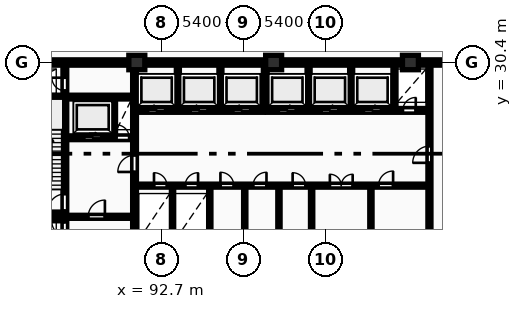
"""IFC4 building model, lengths in metres.
Left out: names, types, materials, properties, quantities, classifications, styles, units other than length and angle.
Written with IfcOpenShell. Run it as: python <this file> out.ifc"""

import sys

from ifc_helpers import new_model, si_unit, direction, frame, frame_2d, origin, origin_2d, place, context, subcontext, project, spatial, rectangle, extrude, element, fill, save


model = new_model("IFC4")
c1 = context("Model", 3, precision=1e-05, world=origin(), true_north=direction((0.0, 1.0)))
c2 = subcontext(c1, "Body", "Model", "MODEL_VIEW")
j1 = project(units=[si_unit("LENGTHUNIT", "METRE"), si_unit("PLANEANGLEUNIT", "RADIAN")], contexts=[c1])
p1 = place(None, origin())
s1 = spatial("IfcSite", under=j1, at=p1, CompositionType="ELEMENT")
p2 = place(p1, origin())
s2 = spatial("IfcBuilding", under=s1, at=p2, CompositionType="ELEMENT")
p3 = place(p2, origin())
s3 = spatial("IfcBuildingStorey", under=s2, at=p3, CompositionType="ELEMENT", Elevation=0.0)
for number, where, z_axis, x_axis in (
    (1, (91.1, 30.4, 0.0), (0.0, 0.0, 1.0), (1.0, 0.0, 0.0)),
    (2, (100.1, 30.4, 0.0), (0.0, 0.0, 1.0), (1.0, 0.0, 0.0)),
    (3, (109.1, 30.4, 0.0), (0.0, 0.0, 1.0), (1.0, 0.0, 0.0)),
):
    element("IfcColumn", number, at=place(p3, frame(where, z_axis=z_axis, x_axis=x_axis)), inside=s3, PredefinedType="COLUMN", context=c2, shape_type="SweptSolid", body=[
        extrude(rectangle(XDim=1.05, YDim=0.95, at=origin_2d()), origin(), (0.0, 0.0, 1.0), 5.4),
    ])
p4 = place(p3, frame((81.925, 30.4, 0.0), z_axis=(0.0, 0.0, 1.0), x_axis=(1.0, 0.0, 0.0)))
e4 = element("IfcWall", 4, at=p4, inside=s3, PredefinedType="SHEAR", context=c2, shape_type="SweptSolid", body=[
    extrude(rectangle(XDim=36.265, YDim=0.35, at=frame_2d((18.132, 0.0))), origin(), (0.0, 0.0, 1.0), 5.4),
])
p5 = place(p3, frame((86.365, 18.6, 0.0), z_axis=(0.0, 0.0, 1.0), x_axis=(0.0, 1.0, 0.0)))
e5 = element("IfcWall", 5, at=p5, inside=s3, PredefinedType="SHEAR", context=c2, shape_type="SweptSolid", body=[
    extrude(rectangle(XDim=11.6, YDim=0.25, at=frame_2d((5.8, 0.0))), origin(), (0.0, 0.0, 1.0), 5.4),
])
p6 = place(p5, frame((0.45, 0.0, 0.0)))
e6 = element("IfcOpeningElement", 6, at=p6, cuts=e5, PredefinedType="OPENING", context=c2, shape_type="SweptSolid", body=[
    extrude(rectangle(XDim=0.85, YDim=2.05, at=frame_2d((0.425, 1.025))), frame((0.0, 0.135, 0.0), z_axis=(0.0, -1.0, 0.0), x_axis=(1.0, 0.0, 0.0)), (0.0, 0.0, 1.0), 0.27),
])
p7 = place(p5, frame((2.05, 0.0, 0.0)))
e7 = element("IfcOpeningElement", 7, at=p7, cuts=e5, PredefinedType="OPENING", context=c2, shape_type="SweptSolid", body=[
    extrude(rectangle(XDim=1.1, YDim=2.1, at=frame_2d((0.55, 1.05))), frame((0.0, 0.135, 0.0), z_axis=(0.0, -1.0, 0.0), x_axis=(1.0, 0.0, 0.0)), (0.0, 0.0, 1.0), 0.27),
])
p8 = place(p5, frame((9.95, 0.0, 0.0)))
e8 = element("IfcOpeningElement", 8, at=p8, cuts=e5, PredefinedType="OPENING", context=c2, shape_type="SweptSolid", body=[
    extrude(rectangle(XDim=0.85, YDim=2.05, at=frame_2d((0.425, 1.025))), frame((0.0, 0.135, 0.0), z_axis=(0.0, -1.0, 0.0), x_axis=(1.0, 0.0, 0.0)), (0.0, 0.0, 1.0), 0.27),
])
p9 = place(p3, frame((83.0, 20.275, 0.0), z_axis=(0.0, 0.0, 1.0), x_axis=(1.0, 0.0, 0.0)))
e9 = element("IfcWall", 9, at=p9, inside=s3, PredefinedType="SHEAR", context=c2, shape_type="SweptSolid", body=[
    extrude(rectangle(XDim=3.24, YDim=0.25, at=frame_2d((1.62, 0.0))), origin(), (0.0, 0.0, 1.0), 5.4),
])
p10 = place(p3, frame((83.0, 28.125, 0.0), z_axis=(0.0, 0.0, 1.0), x_axis=(1.0, 0.0, 0.0)))
e10 = element("IfcWall", 10, at=p10, inside=s3, PredefinedType="SHEAR", context=c2, shape_type="SweptSolid", body=[
    extrude(rectangle(XDim=7.82, YDim=0.25, at=frame_2d((3.91, 0.0))), origin(), (0.0, 0.0, 1.0), 5.4),
])
p11 = place(p3, frame((86.5, 25.45, 0.0), z_axis=(0.0, 0.0, 1.0), x_axis=(1.0, 0.0, 0.0)))
e11 = element("IfcWall", 11, at=p11, inside=s3, PredefinedType="SHEAR", context=c2, shape_type="SweptSolid", body=[
    extrude(rectangle(XDim=4.32, YDim=0.25, at=frame_2d((2.16, 0.0))), origin(), (0.0, 0.0, 1.0), 5.4),
])
p12 = place(p11, frame((1.14, 0.0, 0.0)))
e12 = element("IfcOpeningElement", 12, at=p12, cuts=e11, PredefinedType="OPENING", context=c2, shape_type="SweptSolid", body=[
    extrude(rectangle(XDim=1.12, YDim=2.12, at=frame_2d((0.56, 1.06))), frame((0.0, 0.135, 0.0), z_axis=(0.0, -1.0, 0.0), x_axis=(1.0, 0.0, 0.0)), (0.0, 0.0, 1.0), 0.27),
])
p13 = place(p11, frame((3.25, 0.0, 0.0)))
e13 = element("IfcOpeningElement", 13, at=p13, cuts=e11, PredefinedType="OPENING", context=c2, shape_type="SweptSolid", body=[
    extrude(rectangle(XDim=0.85, YDim=2.05, at=frame_2d((0.425, 1.025))), frame((0.0, 0.135, 0.0), z_axis=(0.0, -1.0, 0.0), x_axis=(1.0, 0.0, 0.0)), (0.0, 0.0, 1.0), 0.27),
])
p14 = place(p3, frame((89.6, 25.58, 0.0), z_axis=(0.0, 0.0, 1.0), x_axis=(0.0, 1.0, 0.0)))
e14 = element("IfcWall", 14, at=p14, inside=s3, PredefinedType="PARTITIONING", context=c2, shape_type="SweptSolid", body=[
    extrude(rectangle(XDim=2.42, YDim=0.2, at=frame_2d((1.21, 0.0))), origin(), (0.0, 0.0, 1.0), 5.1),
])
p15 = place(p3, frame((86.5, 20.25, 0.0), z_axis=(0.0, 0.0, 1.0), x_axis=(1.0, 0.0, 0.0)))
e15 = element("IfcWall", 15, at=p15, inside=s3, PredefinedType="PARTITIONING", context=c2, shape_type="SweptSolid", body=[
    extrude(rectangle(XDim=4.32, YDim=0.2, at=frame_2d((2.16, 0.0))), origin(), (0.0, 0.0, 1.0), 5.1),
])
p16 = place(p15, frame((1.4, 0.0, 0.0)))
e16 = element("IfcOpeningElement", 16, at=p16, cuts=e15, PredefinedType="OPENING", context=c2, shape_type="SweptSolid", body=[
    extrude(rectangle(XDim=1.1, YDim=2.1, at=frame_2d((0.55, 1.05))), frame((0.0, 0.11, 0.0), z_axis=(0.0, -1.0, 0.0), x_axis=(1.0, 0.0, 0.0)), (0.0, 0.0, 1.0), 0.22),
])
p17 = place(p3, frame((90.95, 18.6, 0.0), z_axis=(0.0, 0.0, 1.0), x_axis=(0.0, 1.0, 0.0)))
e17 = element("IfcWall", 17, at=p17, inside=s3, PredefinedType="SHEAR", context=c2, shape_type="SweptSolid", body=[
    extrude(rectangle(XDim=11.6, YDim=0.25, at=frame_2d((5.8, 0.0))), origin(), (0.0, 0.0, 1.0), 5.4),
])
p18 = place(p17, frame((4.6, 0.0, 0.0)))
e18 = element("IfcOpeningElement", 18, at=p18, cuts=e17, PredefinedType="OPENING", context=c2, shape_type="SweptSolid", body=[
    extrude(rectangle(XDim=1.1, YDim=2.1, at=frame_2d((0.55, 1.05))), frame((0.0, 0.135, 0.0), z_axis=(0.0, -1.0, 0.0), x_axis=(1.0, 0.0, 0.0)), (0.0, 0.0, 1.0), 0.27),
])
for number, where, z_axis, x_axis in (
    (19, (93.8, 27.38, 0.0), (0.0, 0.0, 1.0), (0.0, 1.0, 0.0)),
    (20, (96.6, 27.38, 0.0), (0.0, 0.0, 1.0), (0.0, 1.0, 0.0)),
):
    element("IfcWall", number, at=place(p3, frame(where, z_axis=z_axis, x_axis=x_axis)), inside=s3, PredefinedType="PARTITIONING", context=c2, shape_type="SweptSolid", body=[
        extrude(rectangle(XDim=2.82, YDim=0.2, at=frame_2d((1.41, 0.0))), origin(), (0.0, 0.0, 1.0), 5.1),
    ])
p19 = place(p3, frame((91.08, 27.25, 0.0), z_axis=(0.0, 0.0, 1.0), x_axis=(1.0, 0.0, 0.0)))
e21 = element("IfcWall", 21, at=p19, inside=s3, PredefinedType="SHEAR", context=c2, shape_type="SweptSolid", body=[
    extrude(rectangle(XDim=8.34, YDim=0.25, at=frame_2d((4.17, 0.0))), origin(), (0.0, 0.0, 1.0), 5.4),
])
p20 = place(p19, frame((0.76, 0.0, 0.0)))
e22 = element("IfcOpeningElement", 22, at=p20, cuts=e21, PredefinedType="OPENING", context=c2, shape_type="SweptSolid", body=[
    extrude(rectangle(XDim=1.12, YDim=2.12, at=frame_2d((0.56, 1.06))), frame((0.0, 0.135, 0.0), z_axis=(0.0, -1.0, 0.0), x_axis=(1.0, 0.0, 0.0)), (0.0, 0.0, 1.0), 0.27),
])
p21 = place(p19, frame((3.56, 0.0, 0.0)))
e23 = element("IfcOpeningElement", 23, at=p21, cuts=e21, PredefinedType="OPENING", context=c2, shape_type="SweptSolid", body=[
    extrude(rectangle(XDim=1.12, YDim=2.12, at=frame_2d((0.56, 1.06))), frame((0.0, 0.135, 0.0), z_axis=(0.0, -1.0, 0.0), x_axis=(1.0, 0.0, 0.0)), (0.0, 0.0, 1.0), 0.27),
])
p22 = place(p19, frame((6.36, 0.0, 0.0)))
e24 = element("IfcOpeningElement", 24, at=p22, cuts=e21, PredefinedType="OPENING", context=c2, shape_type="SweptSolid", body=[
    extrude(rectangle(XDim=1.12, YDim=2.12, at=frame_2d((0.56, 1.06))), frame((0.0, 0.135, 0.0), z_axis=(0.0, -1.0, 0.0), x_axis=(1.0, 0.0, 0.0)), (0.0, 0.0, 1.0), 0.27),
])
p23 = place(p3, frame((99.55, 27.25, 0.0), z_axis=(0.0, 0.0, 1.0), x_axis=(0.0, 1.0, 0.0)))
e25 = element("IfcWall", 25, at=p23, inside=s3, PredefinedType="SHEAR", context=c2, shape_type="SweptSolid", body=[
    extrude(rectangle(XDim=2.95, YDim=0.25, at=frame_2d((1.475, 0.0))), origin(), (0.0, 0.0, 1.0), 5.4),
])
for number, where, z_axis, x_axis in (
    (26, (102.4, 27.38, 0.0), (0.0, 0.0, 1.0), (0.0, 1.0, 0.0)),
    (27, (105.2, 27.38, 0.0), (0.0, 0.0, 1.0), (0.0, 1.0, 0.0)),
    (28, (108.05, 27.38, 0.0), (0.0, 0.0, 1.0), (0.0, 1.0, 0.0)),
):
    element("IfcWall", number, at=place(p3, frame(where, z_axis=z_axis, x_axis=x_axis)), inside=s3, PredefinedType="PARTITIONING", context=c2, shape_type="SweptSolid", body=[
        extrude(rectangle(XDim=2.82, YDim=0.2, at=frame_2d((1.41, 0.0))), origin(), (0.0, 0.0, 1.0), 5.1),
    ])
p24 = place(p3, frame((99.68, 27.25, 0.0), z_axis=(0.0, 0.0, 1.0), x_axis=(1.0, 0.0, 0.0)))
e29 = element("IfcWall", 29, at=p24, inside=s3, PredefinedType="SHEAR", context=c2, shape_type="SweptSolid", body=[
    extrude(rectangle(XDim=10.54, YDim=0.25, at=frame_2d((5.27, 0.0))), origin(), (0.0, 0.0, 1.0), 5.4),
])
p25 = place(p24, frame((0.76, 0.0, 0.0)))
e30 = element("IfcOpeningElement", 30, at=p25, cuts=e29, PredefinedType="OPENING", context=c2, shape_type="SweptSolid", body=[
    extrude(rectangle(XDim=1.12, YDim=2.12, at=frame_2d((0.56, 1.06))), frame((0.0, 0.135, 0.0), z_axis=(0.0, -1.0, 0.0), x_axis=(1.0, 0.0, 0.0)), (0.0, 0.0, 1.0), 0.27),
])
p26 = place(p24, frame((3.56, 0.0, 0.0)))
e31 = element("IfcOpeningElement", 31, at=p26, cuts=e29, PredefinedType="OPENING", context=c2, shape_type="SweptSolid", body=[
    extrude(rectangle(XDim=1.12, YDim=2.12, at=frame_2d((0.56, 1.06))), frame((0.0, 0.135, 0.0), z_axis=(0.0, -1.0, 0.0), x_axis=(1.0, 0.0, 0.0)), (0.0, 0.0, 1.0), 0.27),
])
p27 = place(p24, frame((6.36, 0.0, 0.0)))
e32 = element("IfcOpeningElement", 32, at=p27, cuts=e29, PredefinedType="OPENING", context=c2, shape_type="SweptSolid", body=[
    extrude(rectangle(XDim=1.12, YDim=2.12, at=frame_2d((0.56, 1.06))), frame((0.0, 0.135, 0.0), z_axis=(0.0, -1.0, 0.0), x_axis=(1.0, 0.0, 0.0)), (0.0, 0.0, 1.0), 0.27),
])
p28 = place(p24, frame((8.92, 0.0, 0.0)))
e33 = element("IfcOpeningElement", 33, at=p28, cuts=e29, PredefinedType="OPENING", context=c2, shape_type="SweptSolid", body=[
    extrude(rectangle(XDim=0.85, YDim=2.05, at=frame_2d((0.425, 1.025))), frame((0.0, 0.135, 0.0), z_axis=(0.0, -1.0, 0.0), x_axis=(1.0, 0.0, 0.0)), (0.0, 0.0, 1.0), 0.27),
])
for number, where, z_axis, x_axis in (
    (34, (93.45, 18.6, 0.0), (0.0, 0.0, 1.0), (0.0, 1.0, 0.0)),
    (35, (95.9, 18.6, 0.0), (0.0, 0.0, 1.0), (0.0, 1.0, 0.0)),
    (36, (98.2, 18.6, 0.0), (0.0, 0.0, 1.0), (0.0, 1.0, 0.0)),
):
    element("IfcWall", number, at=place(p3, frame(where, z_axis=z_axis, x_axis=x_axis)), inside=s3, PredefinedType="PARTITIONING", context=c2, shape_type="SweptSolid", body=[
        extrude(rectangle(XDim=3.6, YDim=0.15, at=frame_2d((1.8, 0.0))), origin(), (0.0, 0.0, 1.0), 5.1),
    ])
p29 = place(p3, frame((100.45, 18.6, 0.0), z_axis=(0.0, 0.0, 1.0), x_axis=(0.0, 1.0, 0.0)))
e37 = element("IfcWall", 37, at=p29, inside=s3, PredefinedType="PARTITIONING", context=c2, shape_type="SweptSolid", body=[
    extrude(rectangle(XDim=3.6, YDim=0.15, at=frame_2d((1.8, 0.0))), origin(), (0.0, 0.0, 1.0), 4.35),
])
for number, where, z_axis, x_axis in (
    (38, (102.6, 18.6, 0.0), (0.0, 0.0, 1.0), (0.0, 1.0, 0.0)),
    (39, (106.5, 18.6, 0.0), (0.0, 0.0, 1.0), (0.0, 1.0, 0.0)),
):
    element("IfcWall", number, at=place(p3, frame(where, z_axis=z_axis, x_axis=x_axis)), inside=s3, PredefinedType="PARTITIONING", context=c2, shape_type="SweptSolid", body=[
        extrude(rectangle(XDim=3.6, YDim=0.15, at=frame_2d((1.8, 0.0))), origin(), (0.0, 0.0, 1.0), 5.1),
    ])
p30 = place(p3, frame((91.08, 22.3, 0.0), z_axis=(0.0, 0.0, 1.0), x_axis=(1.0, 0.0, 0.0)))
e40 = element("IfcWall", 40, at=p30, inside=s3, PredefinedType="PARTITIONING", context=c2, shape_type="SweptSolid", body=[
    extrude(rectangle(XDim=19.14, YDim=0.2, at=frame_2d((9.57, 0.0))), origin(), (0.0, 0.0, 1.0), 5.1),
])
p31 = place(p30, frame((1.15, 0.0, 0.0)))
e41 = element("IfcOpeningElement", 41, at=p31, cuts=e40, PredefinedType="OPENING", context=c2, shape_type="SweptSolid", body=[
    extrude(rectangle(XDim=0.85, YDim=2.05, at=frame_2d((0.425, 1.025))), frame((0.0, 0.11, 0.0), z_axis=(0.0, -1.0, 0.0), x_axis=(1.0, 0.0, 0.0)), (0.0, 0.0, 1.0), 0.22),
])
p32 = place(p30, frame((3.2, 0.0, 0.0)))
e42 = element("IfcOpeningElement", 42, at=p32, cuts=e40, PredefinedType="OPENING", context=c2, shape_type="SweptSolid", body=[
    extrude(rectangle(XDim=0.85, YDim=2.05, at=frame_2d((0.425, 1.025))), frame((0.0, 0.11, 0.0), z_axis=(0.0, -1.0, 0.0), x_axis=(1.0, 0.0, 0.0)), (0.0, 0.0, 1.0), 0.22),
])
p33 = place(p30, frame((12.72, 0.0, 0.0)))
e43 = element("IfcOpeningElement", 43, at=p33, cuts=e40, PredefinedType="OPENING", context=c2, shape_type="SweptSolid", body=[
    extrude(rectangle(XDim=1.5, YDim=2.2, at=frame_2d((0.75, 1.1))), frame((0.0, 0.11, 0.0), z_axis=(0.0, -1.0, 0.0), x_axis=(1.0, 0.0, 0.0)), (0.0, 0.0, 1.0), 0.22),
])
p34 = place(p30, frame((5.52, 0.0, 0.0)))
e44 = element("IfcOpeningElement", 44, at=p34, cuts=e40, PredefinedType="OPENING", context=c2, shape_type="SweptSolid", body=[
    extrude(rectangle(XDim=0.88, YDim=2.06, at=frame_2d((0.44, 1.03))), frame((0.0, 0.11, 0.0), z_axis=(0.0, -1.0, 0.0), x_axis=(1.0, 0.0, 0.0)), (0.0, 0.0, 1.0), 0.22),
])
p35 = place(p30, frame((7.67, 0.0, 0.0)))
e45 = element("IfcOpeningElement", 45, at=p35, cuts=e40, PredefinedType="OPENING", context=c2, shape_type="SweptSolid", body=[
    extrude(rectangle(XDim=0.88, YDim=2.06, at=frame_2d((0.44, 1.03))), frame((0.0, 0.11, 0.0), z_axis=(0.0, -1.0, 0.0), x_axis=(1.0, 0.0, 0.0)), (0.0, 0.0, 1.0), 0.22),
])
p36 = place(p30, frame((10.27, 0.0, 0.0)))
e46 = element("IfcOpeningElement", 46, at=p36, cuts=e40, PredefinedType="OPENING", context=c2, shape_type="SweptSolid", body=[
    extrude(rectangle(XDim=0.85, YDim=2.05, at=frame_2d((0.425, 1.025))), frame((0.0, 0.11, 0.0), z_axis=(0.0, -1.0, 0.0), x_axis=(1.0, 0.0, 0.0)), (0.0, 0.0, 1.0), 0.22),
])
p37 = place(p30, frame((15.92, 0.0, 0.0)))
e47 = element("IfcOpeningElement", 47, at=p37, cuts=e40, PredefinedType="OPENING", context=c2, shape_type="SweptSolid", body=[
    extrude(rectangle(XDim=0.96, YDim=2.1, at=frame_2d((0.48, 1.05))), frame((0.0, 0.11, 0.0), z_axis=(0.0, -1.0, 0.0), x_axis=(1.0, 0.0, 0.0)), (0.0, 0.0, 1.0), 0.22),
])
p38 = place(p3, frame((110.35, 18.6, 0.0), z_axis=(0.0, 0.0, 1.0), x_axis=(0.0, 1.0, 0.0)))
e48 = element("IfcWall", 48, at=p38, inside=s3, PredefinedType="PARTITIONING", context=c2, shape_type="SweptSolid", body=[
    extrude(rectangle(XDim=11.6, YDim=0.2, at=frame_2d((5.8, 0.0))), origin(), (0.0, 0.0, 1.0), 5.1),
])
p39 = place(p38, frame((5.2, 0.0, 0.0)))
e49 = element("IfcOpeningElement", 49, at=p39, cuts=e48, PredefinedType="OPENING", context=c2, shape_type="SweptSolid", body=[
    extrude(rectangle(XDim=1.1, YDim=2.15, at=frame_2d((0.55, 1.075))), frame((0.0, 0.11, 0.0), z_axis=(0.0, -1.0, 0.0), x_axis=(1.0, 0.0, 0.0)), (0.0, 0.0, 1.0), 0.22),
])
p40 = place(p6, origin())
e50 = element("IfcDoor", 50, at=p40, inside=s3, OperationType="SINGLE_SWING_RIGHT", PredefinedType="DOOR", context=c2, shape_type="SweptSolid", body=[
    extrude(rectangle(XDim=0.85, YDim=2.05, at=frame_2d((0.425, 1.025))), frame((0.0, 0.025, 0.0), z_axis=(0.0, -1.0, 0.0), x_axis=(1.0, 0.0, 0.0)), (0.0, 0.0, 1.0), 0.05),
])
fill(e6, e50)
p41 = place(p7, origin())
e51 = element("IfcDoor", 51, at=p41, inside=s3, OperationType="SINGLE_SWING_LEFT", PredefinedType="DOOR", context=c2, shape_type="SweptSolid", body=[
    extrude(rectangle(XDim=1.1, YDim=2.1, at=frame_2d((0.55, 1.05))), frame((0.0, 0.025, 0.0), z_axis=(0.0, -1.0, 0.0), x_axis=(1.0, 0.0, 0.0)), (0.0, 0.0, 1.0), 0.05),
])
fill(e7, e51)
p42 = place(p8, origin())
e52 = element("IfcDoor", 52, at=p42, inside=s3, OperationType="SINGLE_SWING_RIGHT", PredefinedType="DOOR", context=c2, shape_type="SweptSolid", body=[
    extrude(rectangle(XDim=0.85, YDim=2.05, at=frame_2d((0.425, 1.025))), frame((0.0, 0.025, 0.0), z_axis=(0.0, -1.0, 0.0), x_axis=(1.0, 0.0, 0.0)), (0.0, 0.0, 1.0), 0.05),
])
fill(e8, e52)
p43 = place(p12, origin())
e53 = element("IfcDoor", 53, at=p43, inside=s3, OperationType="SLIDING_TO_RIGHT", PredefinedType="DOOR", context=c2, shape_type="SweptSolid", body=[
    extrude(rectangle(XDim=1.12, YDim=2.12, at=frame_2d((0.56, 1.06))), frame((0.0, 0.025, 0.0), z_axis=(0.0, -1.0, 0.0), x_axis=(1.0, 0.0, 0.0)), (0.0, 0.0, 1.0), 0.05),
])
fill(e12, e53)
p44 = place(p13, origin())
e54 = element("IfcDoor", 54, at=p44, inside=s3, OperationType="SINGLE_SWING_LEFT", PredefinedType="DOOR", context=c2, shape_type="SweptSolid", body=[
    extrude(rectangle(XDim=0.85, YDim=2.05, at=frame_2d((0.425, 1.025))), frame((0.0, 0.025, 0.0), z_axis=(0.0, -1.0, 0.0), x_axis=(1.0, 0.0, 0.0)), (0.0, 0.0, 1.0), 0.05),
])
fill(e13, e54)
p45 = place(p16, origin())
e55 = element("IfcDoor", 55, at=p45, inside=s3, OperationType="SINGLE_SWING_RIGHT", PredefinedType="DOOR", context=c2, shape_type="SweptSolid", body=[
    extrude(rectangle(XDim=1.1, YDim=2.1, at=frame_2d((0.55, 1.05))), frame((0.0, 0.025, 0.0), z_axis=(0.0, -1.0, 0.0), x_axis=(1.0, 0.0, 0.0)), (0.0, 0.0, 1.0), 0.05),
])
fill(e16, e55)
p46 = place(p18, origin())
e56 = element("IfcDoor", 56, at=p46, inside=s3, OperationType="SINGLE_SWING_LEFT", PredefinedType="DOOR", context=c2, shape_type="SweptSolid", body=[
    extrude(rectangle(XDim=1.1, YDim=2.1, at=frame_2d((0.55, 1.05))), frame((0.0, 0.025, 0.0), z_axis=(0.0, -1.0, 0.0), x_axis=(1.0, 0.0, 0.0)), (0.0, 0.0, 1.0), 0.05),
])
fill(e18, e56)
p47 = place(p20, origin())
e57 = element("IfcDoor", 57, at=p47, inside=s3, OperationType="SLIDING_TO_LEFT", PredefinedType="DOOR", context=c2, shape_type="SweptSolid", body=[
    extrude(rectangle(XDim=1.12, YDim=2.12, at=frame_2d((0.56, 1.06))), frame((0.0, 0.025, 0.0), z_axis=(0.0, -1.0, 0.0), x_axis=(1.0, 0.0, 0.0)), (0.0, 0.0, 1.0), 0.05),
])
fill(e22, e57)
p48 = place(p21, origin())
e58 = element("IfcDoor", 58, at=p48, inside=s3, OperationType="SLIDING_TO_LEFT", PredefinedType="DOOR", context=c2, shape_type="SweptSolid", body=[
    extrude(rectangle(XDim=1.12, YDim=2.12, at=frame_2d((0.56, 1.06))), frame((0.0, 0.025, 0.0), z_axis=(0.0, -1.0, 0.0), x_axis=(1.0, 0.0, 0.0)), (0.0, 0.0, 1.0), 0.05),
])
fill(e23, e58)
p49 = place(p22, origin())
e59 = element("IfcDoor", 59, at=p49, inside=s3, OperationType="SLIDING_TO_LEFT", PredefinedType="DOOR", context=c2, shape_type="SweptSolid", body=[
    extrude(rectangle(XDim=1.12, YDim=2.12, at=frame_2d((0.56, 1.06))), frame((0.0, 0.025, 0.0), z_axis=(0.0, -1.0, 0.0), x_axis=(1.0, 0.0, 0.0)), (0.0, 0.0, 1.0), 0.05),
])
fill(e24, e59)
p50 = place(p25, origin())
e60 = element("IfcDoor", 60, at=p50, inside=s3, OperationType="SLIDING_TO_RIGHT", PredefinedType="DOOR", context=c2, shape_type="SweptSolid", body=[
    extrude(rectangle(XDim=1.12, YDim=2.12, at=frame_2d((0.56, 1.06))), frame((0.0, 0.025, 0.0), z_axis=(0.0, -1.0, 0.0), x_axis=(1.0, 0.0, 0.0)), (0.0, 0.0, 1.0), 0.05),
])
fill(e30, e60)
p51 = place(p26, origin())
e61 = element("IfcDoor", 61, at=p51, inside=s3, OperationType="SLIDING_TO_RIGHT", PredefinedType="DOOR", context=c2, shape_type="SweptSolid", body=[
    extrude(rectangle(XDim=1.12, YDim=2.12, at=frame_2d((0.56, 1.06))), frame((0.0, 0.025, 0.0), z_axis=(0.0, -1.0, 0.0), x_axis=(1.0, 0.0, 0.0)), (0.0, 0.0, 1.0), 0.05),
])
fill(e31, e61)
p52 = place(p27, origin())
e62 = element("IfcDoor", 62, at=p52, inside=s3, OperationType="SLIDING_TO_RIGHT", PredefinedType="DOOR", context=c2, shape_type="SweptSolid", body=[
    extrude(rectangle(XDim=1.12, YDim=2.12, at=frame_2d((0.56, 1.06))), frame((0.0, 0.025, 0.0), z_axis=(0.0, -1.0, 0.0), x_axis=(1.0, 0.0, 0.0)), (0.0, 0.0, 1.0), 0.05),
])
fill(e32, e62)
p53 = place(p28, origin())
e63 = element("IfcDoor", 63, at=p53, inside=s3, OperationType="SINGLE_SWING_RIGHT", PredefinedType="DOOR", context=c2, shape_type="SweptSolid", body=[
    extrude(rectangle(XDim=0.85, YDim=2.05, at=frame_2d((0.425, 1.025))), frame((0.0, 0.025, 0.0), z_axis=(0.0, -1.0, 0.0), x_axis=(1.0, 0.0, 0.0)), (0.0, 0.0, 1.0), 0.05),
])
fill(e33, e63)
p54 = place(p31, origin())
e64 = element("IfcDoor", 64, at=p54, inside=s3, OperationType="SINGLE_SWING_LEFT", PredefinedType="DOOR", context=c2, shape_type="SweptSolid", body=[
    extrude(rectangle(XDim=0.85, YDim=2.05, at=frame_2d((0.425, 1.025))), frame((0.0, 0.025, 0.0), z_axis=(0.0, -1.0, 0.0), x_axis=(1.0, 0.0, 0.0)), (0.0, 0.0, 1.0), 0.05),
])
fill(e41, e64)
p55 = place(p32, origin())
e65 = element("IfcDoor", 65, at=p55, inside=s3, OperationType="SINGLE_SWING_RIGHT", PredefinedType="DOOR", context=c2, shape_type="SweptSolid", body=[
    extrude(rectangle(XDim=0.85, YDim=2.05, at=frame_2d((0.425, 1.025))), frame((0.0, 0.025, 0.0), z_axis=(0.0, -1.0, 0.0), x_axis=(1.0, 0.0, 0.0)), (0.0, 0.0, 1.0), 0.05),
])
fill(e42, e65)
p56 = place(p33, origin())
e66 = element("IfcDoor", 66, at=p56, inside=s3, OperationType="DOUBLE_DOOR_SINGLE_SWING", PredefinedType="DOOR", context=c2, shape_type="SweptSolid", body=[
    extrude(rectangle(XDim=1.5, YDim=2.2, at=frame_2d((0.75, 1.1))), frame((0.0, 0.025, 0.0), z_axis=(0.0, -1.0, 0.0), x_axis=(1.0, 0.0, 0.0)), (0.0, 0.0, 1.0), 0.05),
])
fill(e43, e66)
p57 = place(p34, origin())
e67 = element("IfcDoor", 67, at=p57, inside=s3, OperationType="SINGLE_SWING_LEFT", PredefinedType="DOOR", context=c2, shape_type="SweptSolid", body=[
    extrude(rectangle(XDim=0.88, YDim=2.06, at=frame_2d((0.44, 1.03))), frame((0.0, 0.025, 0.0), z_axis=(0.0, -1.0, 0.0), x_axis=(1.0, 0.0, 0.0)), (0.0, 0.0, 1.0), 0.05),
])
fill(e44, e67)
p58 = place(p35, origin())
e68 = element("IfcDoor", 68, at=p58, inside=s3, OperationType="SINGLE_SWING_RIGHT", PredefinedType="DOOR", context=c2, shape_type="SweptSolid", body=[
    extrude(rectangle(XDim=0.88, YDim=2.06, at=frame_2d((0.44, 1.03))), frame((0.0, 0.025, 0.0), z_axis=(0.0, -1.0, 0.0), x_axis=(1.0, 0.0, 0.0)), (0.0, 0.0, 1.0), 0.05),
])
fill(e45, e68)
p59 = place(p36, origin())
e69 = element("IfcDoor", 69, at=p59, inside=s3, OperationType="SINGLE_SWING_LEFT", PredefinedType="DOOR", context=c2, shape_type="SweptSolid", body=[
    extrude(rectangle(XDim=0.85, YDim=2.05, at=frame_2d((0.425, 1.025))), frame((0.0, 0.025, 0.0), z_axis=(0.0, -1.0, 0.0), x_axis=(1.0, 0.0, 0.0)), (0.0, 0.0, 1.0), 0.05),
])
fill(e46, e69)
p60 = place(p37, origin())
e70 = element("IfcDoor", 70, at=p60, inside=s3, OperationType="SINGLE_SWING_RIGHT", PredefinedType="DOOR", context=c2, shape_type="SweptSolid", body=[
    extrude(rectangle(XDim=0.96, YDim=2.1, at=frame_2d((0.48, 1.05))), frame((0.0, 0.025, 0.0), z_axis=(0.0, -1.0, 0.0), x_axis=(1.0, 0.0, 0.0)), (0.0, 0.0, 1.0), 0.05),
])
fill(e47, e70)
p61 = place(p39, origin())
e71 = element("IfcDoor", 71, at=p61, inside=s3, OperationType="SINGLE_SWING_LEFT", PredefinedType="DOOR", context=c2, shape_type="SweptSolid", body=[
    extrude(rectangle(XDim=1.1, YDim=2.15, at=frame_2d((0.55, 1.075))), frame((0.0, 0.025, 0.0), z_axis=(0.0, -1.0, 0.0), x_axis=(1.0, 0.0, 0.0)), (0.0, 0.0, 1.0), 0.05),
])
fill(e49, e71)
save(model, sys.argv[1])
